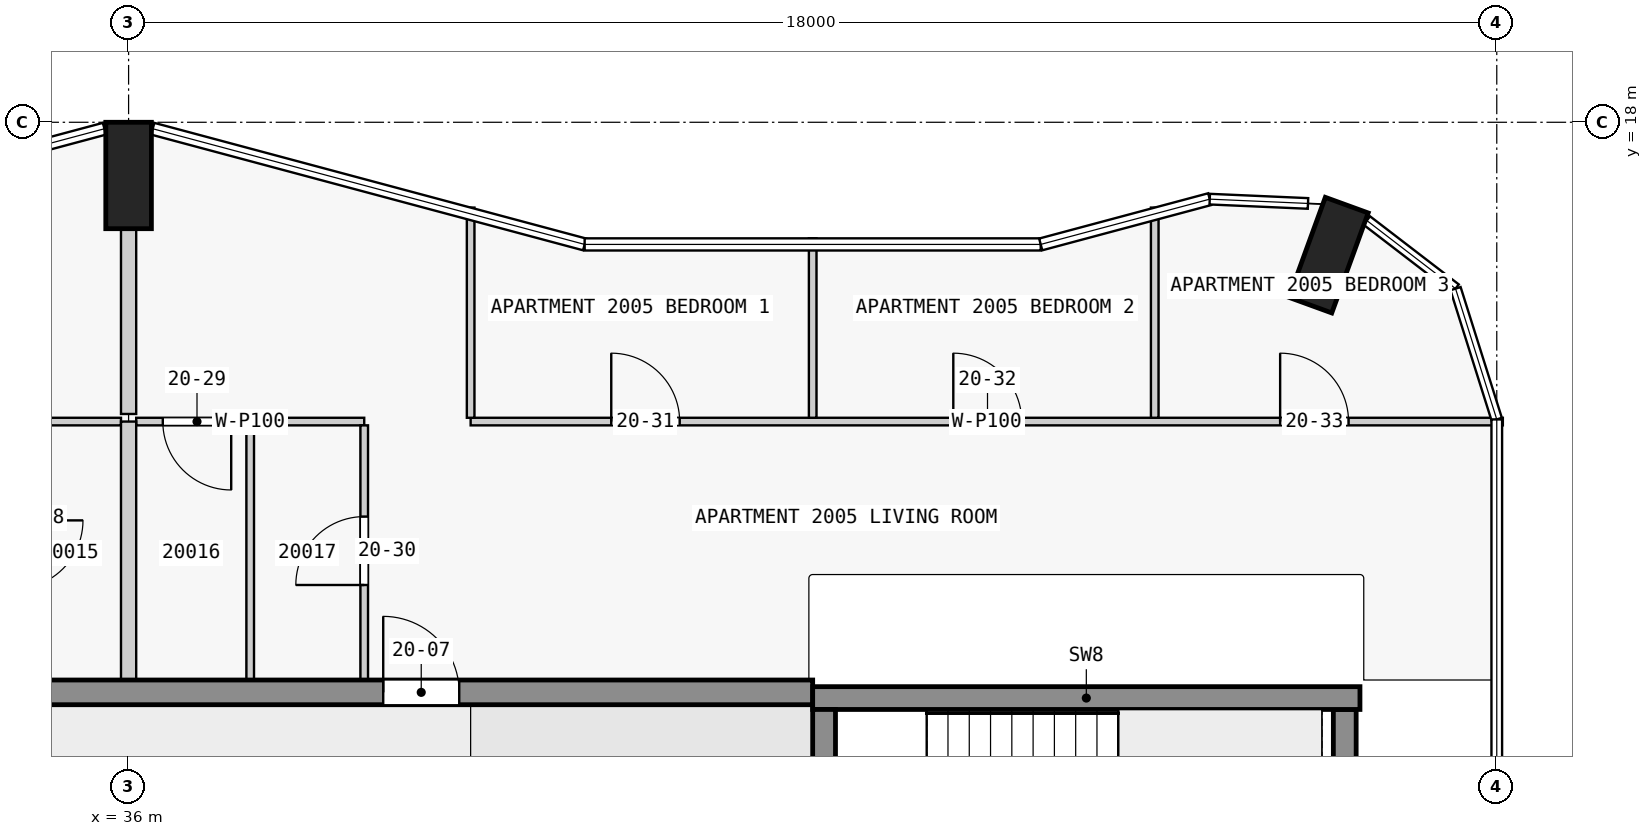
"""IFC4 building model, lengths in metres.
Left out: names, types, materials, properties, quantities, classifications, styles, units other than length and angle.
Written with IfcOpenShell. Run it as: python <this file> out.ifc"""

import sys

from ifc_helpers import new_model, si_unit, direction, frame, frame_2d, origin, origin_2d, place, context, subcontext, project, spatial, rectangle, extrude, element, fill, save


model = new_model("IFC4")
c1 = context("Model", 3, precision=1e-05, world=origin(), true_north=direction((0.0, 1.0)))
c2 = subcontext(c1, "Body", "Model", "MODEL_VIEW")
j1 = project(units=[si_unit("LENGTHUNIT", "METRE"), si_unit("PLANEANGLEUNIT", "RADIAN")], contexts=[c1])
p1 = place(None, origin())
s1 = spatial("IfcSite", under=j1, at=p1, CompositionType="ELEMENT")
p2 = place(p1, origin())
s2 = spatial("IfcBuilding", under=s1, at=p2, CompositionType="ELEMENT")
p3 = place(p2, frame((0.0, 0.0, 81.8)))
s3 = spatial("IfcBuildingStorey", under=s2, at=p3, CompositionType="ELEMENT", Elevation=81.8)
for number, where, z_axis, x_axis in (
    (1, (51.787, 16.252, 0.0), (0.0, 0.0, 1.0), (-0.94, 0.342, 0.0)),
    (2, (36.0, 17.3, 0.0), (0.0, 0.0, 1.0), (1.0, 0.0, 0.0)),
):
    element("IfcColumn", number, at=place(p3, frame(where, z_axis=z_axis, x_axis=x_axis)), inside=s3, PredefinedType="COLUMN", context=c2, shape_type="SweptSolid", body=[
        extrude(rectangle(XDim=0.6, YDim=1.4, at=origin_2d()), origin(), (0.0, 0.0, 1.0), 3.5),
    ])
p4 = place(p3, frame((45.15, 7.725, 0.0), z_axis=(0.0, 0.0, 1.0), x_axis=(0.0, 1.0, 0.0)))
e3 = element("IfcWall", 3, at=p4, inside=s3, PredefinedType="SHEAR", context=c2, shape_type="SweptSolid", body=[
    extrude(rectangle(XDim=2.55, YDim=0.3, at=frame_2d((1.275, 0.0))), origin(), (0.0, 0.0, 1.0), 3.5),
])
p5 = place(p4, frame((0.725, 0.0, 0.0)))
e4 = element("IfcOpeningElement", 4, at=p5, cuts=e3, PredefinedType="OPENING", context=c2, shape_type="SweptSolid", body=[
    extrude(rectangle(XDim=1.1, YDim=2.1, at=frame_2d((0.55, 1.05))), frame((0.0, 0.16, 0.0), z_axis=(0.0, -1.0, 0.0), x_axis=(1.0, 0.0, 0.0)), (0.0, 0.0, 1.0), 0.32),
])
p6 = place(p3, frame((52.0, 7.725, 0.0), z_axis=(0.0, 0.0, 1.0), x_axis=(0.0, 1.0, 0.0)))
e5 = element("IfcWall", 5, at=p6, inside=s3, PredefinedType="SHEAR", context=c2, shape_type="SweptSolid", body=[
    extrude(rectangle(XDim=2.55, YDim=0.3, at=frame_2d((1.275, 0.0))), origin(), (0.0, 0.0, 1.0), 3.5),
])
p7 = place(p3, frame((45.0, 10.425, 0.0), z_axis=(0.0, 0.0, 1.0), x_axis=(1.0, 0.0, 0.0)))
e6 = element("IfcWall", 6, at=p7, inside=s3, PredefinedType="SHEAR", context=c2, shape_type="SweptSolid", body=[
    extrude(rectangle(XDim=7.2, YDim=0.3, at=frame_2d((3.6, 0.0))), origin(), (0.0, 0.0, 1.0), 3.5),
])
p8 = place(p3, frame((22.5, 10.5, 0.0), z_axis=(0.0, 0.0, 1.0), x_axis=(1.0, 0.0, 0.0)))
e7 = element("IfcWall", 7, at=p8, inside=s3, PredefinedType="SHEAR", context=c2, shape_type="SweptSolid", body=[
    extrude(rectangle(XDim=22.5, YDim=0.325, at=frame_2d((11.25, 0.0))), origin(), (0.0, 0.0, 1.0), 3.25),
])
p9 = place(p8, frame((4.05, 0.0, 0.0)))
e8 = element("IfcOpeningElement", 8, at=p9, cuts=e7, PredefinedType="OPENING", context=c2, shape_type="SweptSolid", body=[
    extrude(rectangle(XDim=1.0, YDim=2.1, at=frame_2d((0.5, 1.05))), frame((0.0, 0.172, 0.0), z_axis=(0.0, -1.0, 0.0), x_axis=(1.0, 0.0, 0.0)), (0.0, 0.0, 1.0), 0.345),
])
p10 = place(p8, frame((10.75, 0.0, 0.0)))
e9 = element("IfcOpeningElement", 9, at=p10, cuts=e7, PredefinedType="OPENING", context=c2, shape_type="SweptSolid", body=[
    extrude(rectangle(XDim=1.0, YDim=2.1, at=frame_2d((0.5, 1.05))), frame((0.0, 0.172, 0.0), z_axis=(0.0, -1.0, 0.0), x_axis=(1.0, 0.0, 0.0)), (0.0, 0.0, 1.0), 0.345),
])
p11 = place(p8, frame((16.85, 0.0, 0.0)))
e10 = element("IfcOpeningElement", 10, at=p11, cuts=e7, PredefinedType="OPENING", context=c2, shape_type="SweptSolid", body=[
    extrude(rectangle(XDim=1.0, YDim=2.1, at=frame_2d((0.5, 1.05))), frame((0.0, 0.172, 0.0), z_axis=(0.0, -1.0, 0.0), x_axis=(1.0, 0.0, 0.0)), (0.0, 0.0, 1.0), 0.345),
])
p12 = place(p3, frame((35.9, 14.062, 0.0), z_axis=(0.0, 0.0, 1.0), x_axis=(-1.0, 0.0, 0.0)))
e11 = element("IfcWall", 11, at=p12, inside=s3, PredefinedType="PARTITIONING", context=c2, shape_type="SweptSolid", body=[
    extrude(rectangle(XDim=1.4, YDim=0.1, at=frame_2d((0.7, 0.0))), origin(), (0.0, 0.0, 1.0), 3.25),
])
p13 = place(p3, frame((39.1, 14.062, 0.0), z_axis=(0.0, 0.0, 1.0), x_axis=(-1.0, 0.0, 0.0)))
e12 = element("IfcWall", 12, at=p13, inside=s3, PredefinedType="PARTITIONING", context=c2, shape_type="SweptSolid", body=[
    extrude(rectangle(XDim=3.0, YDim=0.1, at=frame_2d((1.5, 0.0))), origin(), (0.0, 0.0, 1.0), 3.25),
])
p14 = place(p13, frame((1.75, 0.0, 0.0)))
e13 = element("IfcOpeningElement", 13, at=p14, cuts=e12, PredefinedType="OPENING", context=c2, shape_type="SweptSolid", body=[
    extrude(rectangle(XDim=0.9, YDim=2.1, at=frame_2d((0.45, 1.05))), frame((0.0, 0.06, 0.0), z_axis=(0.0, -1.0, 0.0), x_axis=(1.0, 0.0, 0.0)), (0.0, 0.0, 1.0), 0.12),
])
p15 = place(p3, frame((40.5, 14.062, 0.0), z_axis=(0.0, 0.0, 1.0), x_axis=(1.0, 0.0, 0.0)))
e14 = element("IfcWall", 14, at=p15, inside=s3, PredefinedType="PARTITIONING", context=c2, shape_type="SweptSolid", body=[
    extrude(rectangle(XDim=13.58, YDim=0.1, at=frame_2d((6.79, 0.0))), origin(), (0.0, 0.0, 1.0), 3.25),
])
p16 = place(p15, frame((1.85, 0.0, 0.0)))
e15 = element("IfcOpeningElement", 15, at=p16, cuts=e14, PredefinedType="OPENING", context=c2, shape_type="SweptSolid", body=[
    extrude(rectangle(XDim=0.9, YDim=2.1, at=frame_2d((0.45, 1.05))), frame((0.0, 0.06, 0.0), z_axis=(0.0, -1.0, 0.0), x_axis=(1.0, 0.0, 0.0)), (0.0, 0.0, 1.0), 0.12),
])
p17 = place(p15, frame((6.35, 0.0, 0.0)))
e16 = element("IfcOpeningElement", 16, at=p17, cuts=e14, PredefinedType="OPENING", context=c2, shape_type="SweptSolid", body=[
    extrude(rectangle(XDim=0.9, YDim=2.1, at=frame_2d((0.45, 1.05))), frame((0.0, 0.06, 0.0), z_axis=(0.0, -1.0, 0.0), x_axis=(1.0, 0.0, 0.0)), (0.0, 0.0, 1.0), 0.12),
])
p18 = place(p15, frame((10.65, 0.0, 0.0)))
e17 = element("IfcOpeningElement", 17, at=p18, cuts=e14, PredefinedType="OPENING", context=c2, shape_type="SweptSolid", body=[
    extrude(rectangle(XDim=0.9, YDim=2.1, at=frame_2d((0.45, 1.05))), frame((0.0, 0.06, 0.0), z_axis=(0.0, -1.0, 0.0), x_axis=(1.0, 0.0, 0.0)), (0.0, 0.0, 1.0), 0.12),
])
p19 = place(p3, frame((36.0, 16.6, 0.0), z_axis=(0.0, 0.0, 1.0), x_axis=(0.0, -1.0, 0.0)))
e18 = element("IfcWall", 18, at=p19, inside=s3, PredefinedType="PARTITIONING", context=c2, shape_type="SweptSolid", body=[
    extrude(rectangle(XDim=2.438, YDim=0.2, at=frame_2d((1.219, 0.0))), origin(), (0.0, 0.0, 1.0), 3.25),
])
p20 = place(p3, frame((36.0, 10.663, 0.0), z_axis=(0.0, 0.0, 1.0), x_axis=(0.0, 1.0, 0.0)))
e19 = element("IfcWall", 19, at=p20, inside=s3, PredefinedType="PARTITIONING", context=c2, shape_type="SweptSolid", body=[
    extrude(rectangle(XDim=3.4, YDim=0.2, at=frame_2d((1.7, 0.0))), origin(), (0.0, 0.0, 1.0), 3.25),
])
p21 = place(p3, frame((37.6, 10.663, 0.0), z_axis=(0.0, 0.0, 1.0), x_axis=(0.0, 1.0, 0.0)))
e20 = element("IfcWall", 20, at=p21, inside=s3, PredefinedType="PARTITIONING", context=c2, shape_type="SweptSolid", body=[
    extrude(rectangle(XDim=3.35, YDim=0.1, at=frame_2d((1.675, 0.0))), origin(), (0.0, 0.0, 1.0), 3.25),
])
p22 = place(p3, frame((39.1, 10.663, 0.0), z_axis=(0.0, 0.0, 1.0), x_axis=(0.0, 1.0, 0.0)))
e21 = element("IfcWall", 21, at=p22, inside=s3, PredefinedType="PARTITIONING", context=c2, shape_type="SweptSolid", body=[
    extrude(rectangle(XDim=3.35, YDim=0.1, at=frame_2d((1.675, 0.0))), origin(), (0.0, 0.0, 1.0), 3.25),
])
p23 = place(p22, frame((1.25, 0.0, 0.0)))
e22 = element("IfcOpeningElement", 22, at=p23, cuts=e21, PredefinedType="OPENING", context=c2, shape_type="SweptSolid", body=[
    extrude(rectangle(XDim=0.9, YDim=2.1, at=frame_2d((0.45, 1.05))), frame((0.0, 0.06, 0.0), z_axis=(0.0, -1.0, 0.0), x_axis=(1.0, 0.0, 0.0)), (0.0, 0.0, 1.0), 0.12),
])
p24 = place(p3, frame((40.5, 16.878, 0.0), z_axis=(0.0, 0.0, 1.0), x_axis=(0.0, -1.0, 0.0)))
e23 = element("IfcWall", 23, at=p24, inside=s3, PredefinedType="PARTITIONING", context=c2, shape_type="SweptSolid", body=[
    extrude(rectangle(XDim=2.765, YDim=0.1, at=frame_2d((1.383, 0.0))), origin(), (0.0, 0.0, 1.0), 3.25),
])
p25 = place(p3, frame((45.0, 14.113, 0.0), z_axis=(0.0, 0.0, 1.0), x_axis=(0.0, 1.0, 0.0)))
e24 = element("IfcWall", 24, at=p25, inside=s3, PredefinedType="PARTITIONING", context=c2, shape_type="SweptSolid", body=[
    extrude(rectangle(XDim=2.361, YDim=0.1, at=frame_2d((1.18, 0.0))), origin(), (0.0, 0.0, 1.0), 3.25),
])
p26 = place(p3, frame((49.5, 14.113, 0.0), z_axis=(0.0, 0.0, 1.0), x_axis=(0.0, 1.0, 0.0)))
e25 = element("IfcWall", 25, at=p26, inside=s3, PredefinedType="PARTITIONING", context=c2, shape_type="SweptSolid", body=[
    extrude(rectangle(XDim=2.765, YDim=0.1, at=frame_2d((1.383, 0.0))), origin(), (0.0, 0.0, 1.0), 3.25),
])
p27 = place(p11, origin())
e26 = element("IfcDoor", 26, at=p27, inside=s3, OperationType="SINGLE_SWING_RIGHT", PredefinedType="DOOR", context=c2, shape_type="SweptSolid", body=[
    extrude(rectangle(XDim=1.0, YDim=2.1, at=frame_2d((0.5, 1.05))), frame((0.0, 0.025, 0.0), z_axis=(0.0, -1.0, 0.0), x_axis=(1.0, 0.0, 0.0)), (0.0, 0.0, 1.0), 0.05),
])
fill(e10, e26)
p28 = place(p14, origin())
e27 = element("IfcDoor", 27, at=p28, inside=s3, OperationType="SINGLE_SWING_RIGHT", PredefinedType="DOOR", context=c2, shape_type="SweptSolid", body=[
    extrude(rectangle(XDim=0.9, YDim=2.1, at=frame_2d((0.45, 1.05))), frame((0.0, 0.025, 0.0), z_axis=(0.0, -1.0, 0.0), x_axis=(1.0, 0.0, 0.0)), (0.0, 0.0, 1.0), 0.05),
])
fill(e13, e27)
p29 = place(p23, origin())
e28 = element("IfcDoor", 28, at=p29, inside=s3, OperationType="SINGLE_SWING_RIGHT", PredefinedType="DOOR", context=c2, shape_type="SweptSolid", body=[
    extrude(rectangle(XDim=0.9, YDim=2.1, at=frame_2d((0.45, 1.05))), frame((0.0, 0.025, 0.0), z_axis=(0.0, -1.0, 0.0), x_axis=(1.0, 0.0, 0.0)), (0.0, 0.0, 1.0), 0.05),
])
fill(e22, e28)
p30 = place(p16, origin())
e29 = element("IfcDoor", 29, at=p30, inside=s3, OperationType="SINGLE_SWING_LEFT", PredefinedType="DOOR", context=c2, shape_type="SweptSolid", body=[
    extrude(rectangle(XDim=0.9, YDim=2.1, at=frame_2d((0.45, 1.05))), frame((0.0, 0.025, 0.0), z_axis=(0.0, -1.0, 0.0), x_axis=(1.0, 0.0, 0.0)), (0.0, 0.0, 1.0), 0.05),
])
fill(e15, e29)
p31 = place(p17, origin())
e30 = element("IfcDoor", 30, at=p31, inside=s3, OperationType="SINGLE_SWING_RIGHT", PredefinedType="DOOR", context=c2, shape_type="SweptSolid", body=[
    extrude(rectangle(XDim=0.9, YDim=2.1, at=frame_2d((0.45, 1.05))), frame((0.0, 0.025, 0.0), z_axis=(0.0, -1.0, 0.0), x_axis=(1.0, 0.0, 0.0)), (0.0, 0.0, 1.0), 0.05),
])
fill(e16, e30)
p32 = place(p18, origin())
e31 = element("IfcDoor", 31, at=p32, inside=s3, OperationType="SINGLE_SWING_RIGHT", PredefinedType="DOOR", context=c2, shape_type="SweptSolid", body=[
    extrude(rectangle(XDim=0.9, YDim=2.1, at=frame_2d((0.45, 1.05))), frame((0.0, 0.025, 0.0), z_axis=(0.0, -1.0, 0.0), x_axis=(1.0, 0.0, 0.0)), (0.0, 0.0, 1.0), 0.05),
])
fill(e17, e31)
save(model, sys.argv[1])
